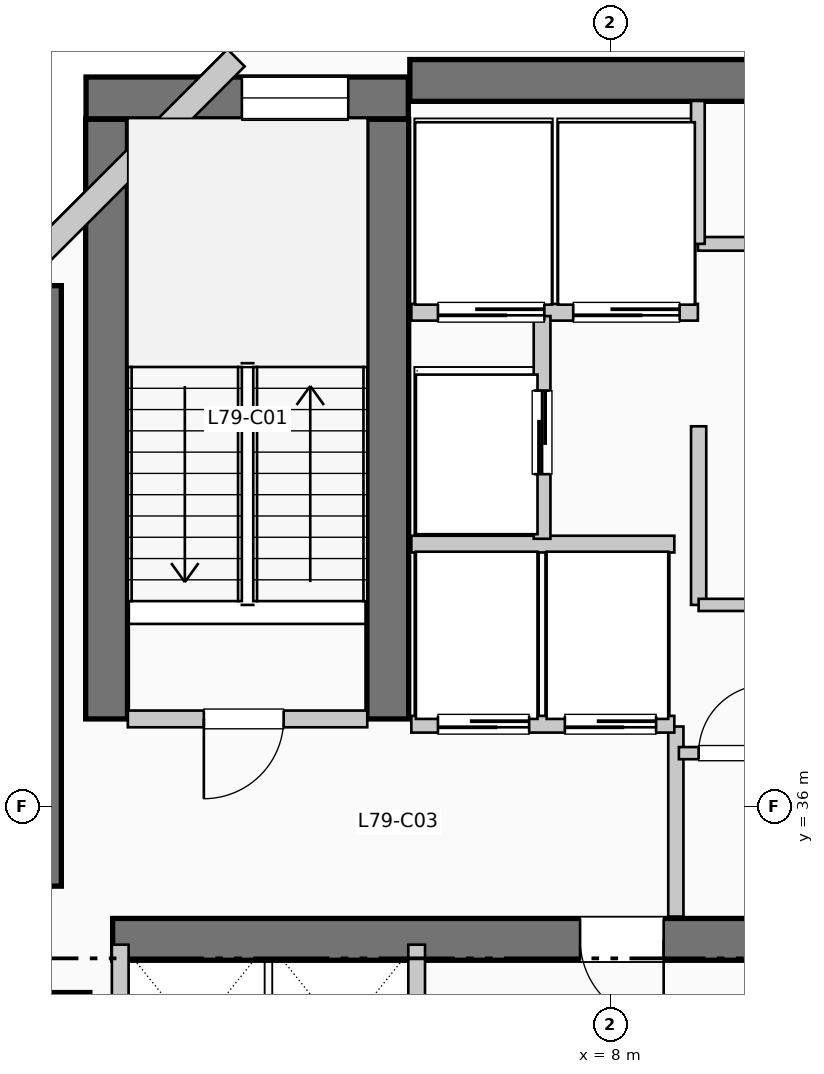
"""IFC4 building model, lengths in metres.
Left out: names, types, materials, properties, quantities, classifications, styles, units other than length and angle.
Written with IfcOpenShell. Run it as: python <this file> out.ifc"""

import sys

from ifc_helpers import new_model, si_unit, direction, frame, frame_2d, origin, origin_2d, place, context, subcontext, project, spatial, rectangle, extrude, element, fill, save


model = new_model("IFC4")
c1 = context("Model", 3, precision=1e-05, world=origin(), true_north=direction((0.0, 1.0)))
c2 = subcontext(c1, "Body", "Model", "MODEL_VIEW")
j1 = project(units=[si_unit("LENGTHUNIT", "METRE"), si_unit("PLANEANGLEUNIT", "RADIAN")], contexts=[c1])
p1 = place(None, origin())
s1 = spatial("IfcSite", under=j1, at=p1, CompositionType="ELEMENT")
p2 = place(p1, origin())
s2 = spatial("IfcBuilding", under=s1, at=p2, CompositionType="ELEMENT")
p3 = place(p2, frame((0.0, 0.0, 323.73)))
s3 = spatial("IfcBuildingStorey", under=s2, at=p3, CompositionType="ELEMENT", Elevation=323.73)
p4 = place(p3, frame((5.36, 45.55, 0.0), z_axis=(0.0, 0.0, 1.0), x_axis=(1.0, 0.0, 0.0)))
e1 = element("IfcWall", 1, at=p4, inside=s3, PredefinedType="SHEAR", context=c2, shape_type="SweptSolid", body=[
    extrude(rectangle(XDim=13.98, YDim=0.55, at=frame_2d((6.99, 0.0))), origin(), (0.0, 0.0, 1.0), 3.96),
])
p5 = place(p3, frame((0.5, 34.95, 0.0), z_axis=(0.0, 0.0, 1.0), x_axis=(0.0, 1.0, 0.0)))
e2 = element("IfcWall", 2, at=p5, inside=s3, PredefinedType="SHEAR", context=c2, shape_type="SweptSolid", body=[
    extrude(rectangle(XDim=7.9, YDim=0.55, at=frame_2d((3.95, 0.0))), origin(), (0.0, 0.0, 1.0), 3.96),
])
p6 = place(p3, frame((1.45, 34.25, 0.0), z_axis=(0.0, 0.0, 1.0), x_axis=(1.0, 0.0, 0.0)))
e3 = element("IfcWall", 3, at=p6, inside=s3, PredefinedType="SHEAR", context=c2, shape_type="SweptSolid", body=[
    extrude(rectangle(XDim=10.71, YDim=0.55, at=frame_2d((5.355, 0.0))), origin(), (0.0, 0.0, 1.0), 3.96),
])
p7 = place(p6, frame((7.25, 0.0, 0.0), z_axis=(0.0, 0.0, 1.0), x_axis=(-1.0, 0.0, 0.0)))
e4 = element("IfcOpeningElement", 4, at=p7, cuts=e3, PredefinedType="OPENING", context=c2, shape_type="SweptSolid", body=[
    extrude(rectangle(XDim=1.1, YDim=2.15, at=frame_2d((0.55, 1.075))), frame((0.0, 0.285, 0.0), z_axis=(0.0, -1.0, 0.0), x_axis=(1.0, 0.0, 0.0)), (0.0, 0.0, 1.0), 0.57),
])
for number, where, z_axis, x_axis in (
    (5, (1.37, 37.15, 0.0), (0.0, 0.0, 1.0), (0.0, 1.0, 0.0)),
    (6, (5.07, 37.15, 0.0), (0.0, 0.0, 1.0), (0.0, 1.0, 0.0)),
):
    element("IfcWall", number, at=place(p3, frame(where, z_axis=z_axis, x_axis=x_axis)), inside=s3, PredefinedType="SHEAR", context=c2, shape_type="SweptSolid", body=[
        extrude(rectangle(XDim=7.89, YDim=0.55, at=frame_2d((3.945, 0.0))), origin(), (0.0, 0.0, 1.0), 3.96),
    ])
p8 = place(p3, frame((1.1, 45.32, 0.0), z_axis=(0.0, 0.0, 1.0), x_axis=(1.0, 0.0, 0.0)))
e7 = element("IfcWall", 7, at=p8, inside=s3, PredefinedType="SHEAR", context=c2, shape_type="SweptSolid", body=[
    extrude(rectangle(XDim=4.24, YDim=0.55, at=frame_2d((2.12, 0.0))), origin(), (0.0, 0.0, 1.0), 3.96),
])
p9 = place(p8, frame((2.05, 0.0, 1.05)))
e8 = element("IfcOpeningElement", 8, at=p9, cuts=e7, PredefinedType="OPENING", context=c2, shape_type="SweptSolid", body=[
    extrude(rectangle(XDim=1.4, YDim=1.8, at=frame_2d((0.7, 0.9))), frame((0.0, 0.285, 0.0), z_axis=(0.0, -1.0, 0.0), x_axis=(1.0, 0.0, 0.0)), (0.0, 0.0, 1.0), 0.57),
])
p10 = place(p3, frame((0.8, 33.2, 0.0), z_axis=(0.0, 0.0, 1.0), x_axis=(1.0, 0.0, 0.0)))
e9 = element("IfcColumn", 9, at=p10, inside=s3, PredefinedType="COLUMN", context=c2, shape_type="SweptSolid", body=[
    extrude(rectangle(XDim=0.7, YDim=0.7, at=origin_2d()), origin(), (0.0, 0.0, 1.0), 3.96),
])
p11 = place(p3, frame((3.074, 45.848, 0.0), z_axis=(0.0, 0.0, 1.0), x_axis=(-0.707106781187, -0.707106781187, 0.0)))
e10 = element("IfcWall", 10, at=p11, inside=s3, PredefinedType="SOLIDWALL", context=c2, shape_type="SweptSolid", body=[
    extrude(rectangle(XDim=4.133, YDim=0.32, at=frame_2d((2.066, 0.0))), origin(), (0.0, 0.0, 1.0), 3.74),
])
p12 = place(p3, frame((1.65, 37.15, 0.0), z_axis=(0.0, 0.0, 1.0), x_axis=(1.0, 0.0, 0.0)))
e11 = element("IfcWall", 11, at=p12, inside=s3, PredefinedType="PARTITIONING", context=c2, shape_type="SweptSolid", body=[
    extrude(rectangle(XDim=3.15, YDim=0.22, at=frame_2d((1.575, 0.0))), origin(), (0.0, 0.0, 1.0), 3.74),
])
p13 = place(p12, frame((2.05, 0.0, 0.0), z_axis=(0.0, 0.0, 1.0), x_axis=(-1.0, 0.0, 0.0)))
e12 = element("IfcOpeningElement", 12, at=p13, cuts=e11, PredefinedType="OPENING", context=c2, shape_type="SweptSolid", body=[
    extrude(rectangle(XDim=1.05, YDim=2.15, at=frame_2d((0.525, 1.075))), frame((0.0, 0.12, 0.0), z_axis=(0.0, -1.0, 0.0), x_axis=(1.0, 0.0, 0.0)), (0.0, 0.0, 1.0), 0.24),
])
p14 = place(p3, frame((8.86, 34.55, 0.0), z_axis=(0.0, 0.0, 1.0), x_axis=(0.0, 1.0, 0.0)))
e13 = element("IfcWall", 13, at=p14, inside=s3, PredefinedType="PARTITIONING", context=c2, shape_type="SweptSolid", body=[
    extrude(rectangle(XDim=2.5, YDim=0.2, at=frame_2d((1.25, 0.0))), origin(), (0.0, 0.0, 1.0), 3.74),
])
p15 = place(p3, frame((5.38, 37.08, 0.0), z_axis=(0.0, 0.0, 1.0), x_axis=(1.0, 0.0, 0.0)))
e14 = element("IfcWall", 14, at=p15, inside=s3, PredefinedType="PARTITIONING", context=c2, shape_type="SweptSolid", body=[
    extrude(rectangle(XDim=3.46, YDim=0.22, at=frame_2d((1.73, 0.0))), origin(), (0.0, 0.0, 1.0), 3.74),
])
p16 = place(p15, frame((1.55, 0.0, 0.0), z_axis=(0.0, 0.0, 1.0), x_axis=(-1.0, 0.0, 0.0)))
e15 = element("IfcOpeningElement", 15, at=p16, cuts=e14, PredefinedType="OPENING", context=c2, shape_type="SweptSolid", body=[
    extrude(rectangle(XDim=1.2, YDim=2.2, at=frame_2d((0.6, 1.1))), frame((0.0, 0.12, 0.0), z_axis=(0.0, -1.0, 0.0), x_axis=(1.0, 0.0, 0.0)), (0.0, 0.0, 1.0), 0.24),
])
p17 = place(p15, frame((3.22, 0.0, 0.0), z_axis=(0.0, 0.0, 1.0), x_axis=(-1.0, 0.0, 0.0)))
e16 = element("IfcOpeningElement", 16, at=p17, cuts=e14, PredefinedType="OPENING", context=c2, shape_type="SweptSolid", body=[
    extrude(rectangle(XDim=1.2, YDim=2.2, at=frame_2d((0.6, 1.1))), frame((0.0, 0.12, 0.0), z_axis=(0.0, -1.0, 0.0), x_axis=(1.0, 0.0, 0.0)), (0.0, 0.0, 1.0), 0.24),
])
p18 = place(p3, frame((5.38, 39.45, 0.0), z_axis=(0.0, 0.0, 1.0), x_axis=(1.0, 0.0, 0.0)))
e17 = element("IfcWall", 17, at=p18, inside=s3, PredefinedType="PARTITIONING", context=c2, shape_type="SweptSolid", body=[
    extrude(rectangle(XDim=3.46, YDim=0.22, at=frame_2d((1.73, 0.0))), origin(), (0.0, 0.0, 1.0), 3.74),
])
p19 = place(p3, frame((5.38, 42.5, 0.0), z_axis=(0.0, 0.0, 1.0), x_axis=(1.0, 0.0, 0.0)))
e18 = element("IfcWall", 18, at=p19, inside=s3, PredefinedType="PARTITIONING", context=c2, shape_type="SweptSolid", body=[
    extrude(rectangle(XDim=3.77, YDim=0.22, at=frame_2d((1.885, 0.0))), origin(), (0.0, 0.0, 1.0), 3.74),
])
p20 = place(p19, frame((1.75, 0.0, 0.0), z_axis=(0.0, 0.0, 1.0), x_axis=(-1.0, 0.0, 0.0)))
e19 = element("IfcOpeningElement", 19, at=p20, cuts=e18, PredefinedType="OPENING", context=c2, shape_type="SweptSolid", body=[
    extrude(rectangle(XDim=1.4, YDim=2.2, at=frame_2d((0.7, 1.1))), frame((0.0, 0.12, 0.0), z_axis=(0.0, -1.0, 0.0), x_axis=(1.0, 0.0, 0.0)), (0.0, 0.0, 1.0), 0.24),
])
p21 = place(p19, frame((3.53, 0.0, 0.0), z_axis=(0.0, 0.0, 1.0), x_axis=(-1.0, 0.0, 0.0)))
e20 = element("IfcOpeningElement", 20, at=p21, cuts=e18, PredefinedType="OPENING", context=c2, shape_type="SweptSolid", body=[
    extrude(rectangle(XDim=1.4, YDim=2.2, at=frame_2d((0.7, 1.1))), frame((0.0, 0.12, 0.0), z_axis=(0.0, -1.0, 0.0), x_axis=(1.0, 0.0, 0.0)), (0.0, 0.0, 1.0), 0.24),
])
p22 = place(p3, frame((7.1, 39.52, 0.0), z_axis=(0.0, 0.0, 1.0), x_axis=(0.0, 1.0, 0.0)))
e21 = element("IfcWall", 21, at=p22, inside=s3, PredefinedType="PARTITIONING", context=c2, shape_type="SweptSolid", body=[
    extrude(rectangle(XDim=2.93, YDim=0.22, at=frame_2d((1.465, 0.0))), origin(), (0.0, 0.0, 1.0), 3.74),
])
p23 = place(p22, frame((0.85, 0.0, 0.0)))
e22 = element("IfcOpeningElement", 22, at=p23, cuts=e21, PredefinedType="OPENING", context=c2, shape_type="SweptSolid", body=[
    extrude(rectangle(XDim=1.1, YDim=2.2, at=frame_2d((0.55, 1.1))), frame((0.0, 0.12, 0.0), z_axis=(0.0, -1.0, 0.0), x_axis=(1.0, 0.0, 0.0)), (0.0, 0.0, 1.0), 0.24),
])
for number, where, z_axis, x_axis in (
    (23, (1.55, 31.8, 0.0), (0.0, 0.0, 1.0), (0.0, 1.0, 0.0)),
    (24, (5.45, 31.8, 0.0), (0.0, 0.0, 1.0), (0.0, 1.0, 0.0)),
):
    element("IfcWall", number, at=place(p3, frame(where, z_axis=z_axis, x_axis=x_axis)), inside=s3, PredefinedType="PARTITIONING", context=c2, shape_type="SweptSolid", body=[
        extrude(rectangle(XDim=2.38, YDim=0.22, at=frame_2d((1.19, 0.0))), origin(), (0.0, 0.0, 1.0), 3.74),
    ])
p24 = place(p3, frame((9.16, 38.65, 0.0), z_axis=(0.0, 0.0, 1.0), x_axis=(0.0, 1.0, 0.0)))
e25 = element("IfcWall", 25, at=p24, inside=s3, PredefinedType="PARTITIONING", context=c2, shape_type="SweptSolid", body=[
    extrude(rectangle(XDim=2.35, YDim=0.2, at=frame_2d((1.175, 0.0))), origin(), (0.0, 0.0, 1.0), 3.74),
])
p25 = place(p3, frame((8.9, 36.7, 0.0), z_axis=(0.0, 0.0, 1.0), x_axis=(1.0, 0.0, 0.0)))
e26 = element("IfcWall", 26, at=p25, inside=s3, PredefinedType="PARTITIONING", context=c2, shape_type="SweptSolid", body=[
    extrude(rectangle(XDim=3.25, YDim=0.16, at=frame_2d((1.625, 0.0))), origin(), (0.0, 0.0, 1.0), 3.74),
])
p26 = place(p25, frame((0.26, 0.0, 0.0)))
e27 = element("IfcOpeningElement", 27, at=p26, cuts=e26, PredefinedType="OPENING", context=c2, shape_type="SweptSolid", body=[
    extrude(rectangle(XDim=0.9, YDim=2.15, at=frame_2d((0.45, 1.075))), frame((0.0, 0.09, 0.0), z_axis=(0.0, -1.0, 0.0), x_axis=(1.0, 0.0, 0.0)), (0.0, 0.0, 1.0), 0.18),
])
p27 = place(p25, frame((1.68, 0.0, 0.0)))
e28 = element("IfcOpeningElement", 28, at=p27, cuts=e26, PredefinedType="OPENING", context=c2, shape_type="SweptSolid", body=[
    extrude(rectangle(XDim=0.9, YDim=2.15, at=frame_2d((0.45, 1.075))), frame((0.0, 0.09, 0.0), z_axis=(0.0, -1.0, 0.0), x_axis=(1.0, 0.0, 0.0)), (0.0, 0.0, 1.0), 0.18),
])
p28 = place(p3, frame((9.16, 38.65, 0.0), z_axis=(0.0, 0.0, 1.0), x_axis=(1.0, 0.0, 0.0)))
e29 = element("IfcWall", 29, at=p28, inside=s3, PredefinedType="PARTITIONING", context=c2, shape_type="SweptSolid", body=[
    extrude(rectangle(XDim=3.42, YDim=0.16, at=frame_2d((1.71, 0.0))), origin(), (0.0, 0.0, 1.0), 3.74),
])
p29 = place(p28, frame((2.15, 0.0, 0.0), z_axis=(0.0, 0.0, 1.0), x_axis=(-1.0, 0.0, 0.0)))
e30 = element("IfcOpeningElement", 30, at=p29, cuts=e29, PredefinedType="OPENING", context=c2, shape_type="SweptSolid", body=[
    extrude(rectangle(XDim=0.95, YDim=2.15, at=frame_2d((0.475, 1.075))), frame((0.0, 0.09, 0.0), z_axis=(0.0, -1.0, 0.0), x_axis=(1.0, 0.0, 0.0)), (0.0, 0.0, 1.0), 0.18),
])
p30 = place(p3, frame((9.15, 43.4, 0.0), z_axis=(0.0, 0.0, 1.0), x_axis=(1.0, 0.0, 0.0)))
e31 = element("IfcWall", 31, at=p30, inside=s3, PredefinedType="PLUMBINGWALL", context=c2, shape_type="SweptSolid", body=[
    extrude(rectangle(XDim=9.33, YDim=0.18, at=frame_2d((4.665, 0.0))), origin(), (0.0, 0.0, 1.0), 3.74),
])
p31 = place(p30, frame((1.88, 0.0, 0.0)))
e32 = element("IfcOpeningElement", 32, at=p31, cuts=e31, PredefinedType="OPENING", context=c2, shape_type="SweptSolid", body=[
    extrude(rectangle(XDim=0.92, YDim=2.1, at=frame_2d((0.46, 1.05))), frame((0.0, 0.1, 0.0), z_axis=(0.0, -1.0, 0.0), x_axis=(1.0, 0.0, 0.0)), (0.0, 0.0, 1.0), 0.2),
])
p32 = place(p30, frame((6.515, 0.0, 0.0)))
e33 = element("IfcOpeningElement", 33, at=p32, cuts=e31, PredefinedType="OPENING", context=c2, shape_type="SweptSolid", body=[
    extrude(rectangle(XDim=0.92, YDim=2.1, at=frame_2d((0.46, 1.05))), frame((0.0, 0.1, 0.0), z_axis=(0.0, -1.0, 0.0), x_axis=(1.0, 0.0, 0.0)), (0.0, 0.0, 1.0), 0.2),
])
p33 = place(p3, frame((9.15, 43.4, 0.0), z_axis=(0.0, 0.0, 1.0), x_axis=(0.0, 1.0, 0.0)))
e34 = element("IfcWall", 34, at=p33, inside=s3, PredefinedType="PLUMBINGWALL", context=c2, shape_type="SweptSolid", body=[
    extrude(rectangle(XDim=1.88, YDim=0.18, at=frame_2d((0.94, 0.0))), origin(), (0.0, 0.0, 1.0), 3.74),
])
p34 = place(p9, origin())
e35 = element("IfcWindow", 35, at=p34, inside=s3, PartitioningType="SINGLE_PANEL", PredefinedType="WINDOW", context=c2, shape_type="SweptSolid", body=[
    extrude(rectangle(XDim=1.4, YDim=1.8, at=frame_2d((0.7, 0.9))), frame((0.0, 0.03, 0.0), z_axis=(0.0, -1.0, 0.0), x_axis=(1.0, 0.0, 0.0)), (0.0, 0.0, 1.0), 0.06),
])
fill(e8, e35)
p35 = place(p13, origin())
e36 = element("IfcDoor", 36, at=p35, inside=s3, OperationType="SINGLE_SWING_LEFT", PredefinedType="DOOR", context=c2, shape_type="SweptSolid", body=[
    extrude(rectangle(XDim=1.05, YDim=2.15, at=frame_2d((0.525, 1.075))), frame((0.0, 0.025, 0.0), z_axis=(0.0, -1.0, 0.0), x_axis=(1.0, 0.0, 0.0)), (0.0, 0.0, 1.0), 0.05),
])
fill(e12, e36)
p36 = place(p7, origin())
e37 = element("IfcDoor", 37, at=p36, inside=s3, OperationType="SINGLE_SWING_RIGHT", PredefinedType="DOOR", context=c2, shape_type="SweptSolid", body=[
    extrude(rectangle(XDim=1.1, YDim=2.15, at=frame_2d((0.55, 1.075))), frame((0.0, 0.025, 0.0), z_axis=(0.0, -1.0, 0.0), x_axis=(1.0, 0.0, 0.0)), (0.0, 0.0, 1.0), 0.05),
])
fill(e4, e37)
p37 = place(p16, origin())
e38 = element("IfcDoor", 38, at=p37, inside=s3, OperationType="SLIDING_TO_RIGHT", PredefinedType="DOOR", context=c2, shape_type="SweptSolid", body=[
    extrude(rectangle(XDim=1.2, YDim=2.2, at=frame_2d((0.6, 1.1))), frame((0.0, 0.025, 0.0), z_axis=(0.0, -1.0, 0.0), x_axis=(1.0, 0.0, 0.0)), (0.0, 0.0, 1.0), 0.05),
])
fill(e15, e38)
p38 = place(p17, origin())
e39 = element("IfcDoor", 39, at=p38, inside=s3, OperationType="SLIDING_TO_RIGHT", PredefinedType="DOOR", context=c2, shape_type="SweptSolid", body=[
    extrude(rectangle(XDim=1.2, YDim=2.2, at=frame_2d((0.6, 1.1))), frame((0.0, 0.025, 0.0), z_axis=(0.0, -1.0, 0.0), x_axis=(1.0, 0.0, 0.0)), (0.0, 0.0, 1.0), 0.05),
])
fill(e16, e39)
p39 = place(p20, origin())
e40 = element("IfcDoor", 40, at=p39, inside=s3, OperationType="SLIDING_TO_LEFT", PredefinedType="DOOR", context=c2, shape_type="SweptSolid", body=[
    extrude(rectangle(XDim=1.4, YDim=2.2, at=frame_2d((0.7, 1.1))), frame((0.0, 0.025, 0.0), z_axis=(0.0, -1.0, 0.0), x_axis=(1.0, 0.0, 0.0)), (0.0, 0.0, 1.0), 0.05),
])
fill(e19, e40)
p40 = place(p21, origin())
e41 = element("IfcDoor", 41, at=p40, inside=s3, OperationType="SLIDING_TO_LEFT", PredefinedType="DOOR", context=c2, shape_type="SweptSolid", body=[
    extrude(rectangle(XDim=1.4, YDim=2.2, at=frame_2d((0.7, 1.1))), frame((0.0, 0.025, 0.0), z_axis=(0.0, -1.0, 0.0), x_axis=(1.0, 0.0, 0.0)), (0.0, 0.0, 1.0), 0.05),
])
fill(e20, e41)
p41 = place(p23, origin())
e42 = element("IfcDoor", 42, at=p41, inside=s3, OperationType="SLIDING_TO_LEFT", PredefinedType="DOOR", context=c2, shape_type="SweptSolid", body=[
    extrude(rectangle(XDim=1.1, YDim=2.2, at=frame_2d((0.55, 1.1))), frame((0.0, 0.025, 0.0), z_axis=(0.0, -1.0, 0.0), x_axis=(1.0, 0.0, 0.0)), (0.0, 0.0, 1.0), 0.05),
])
fill(e22, e42)
p42 = place(p26, origin())
e43 = element("IfcDoor", 43, at=p42, inside=s3, OperationType="SINGLE_SWING_RIGHT", PredefinedType="DOOR", context=c2, shape_type="SweptSolid", body=[
    extrude(rectangle(XDim=0.9, YDim=2.15, at=frame_2d((0.45, 1.075))), frame((0.0, 0.025, 0.0), z_axis=(0.0, -1.0, 0.0), x_axis=(1.0, 0.0, 0.0)), (0.0, 0.0, 1.0), 0.05),
])
fill(e27, e43)
save(model, sys.argv[1])
